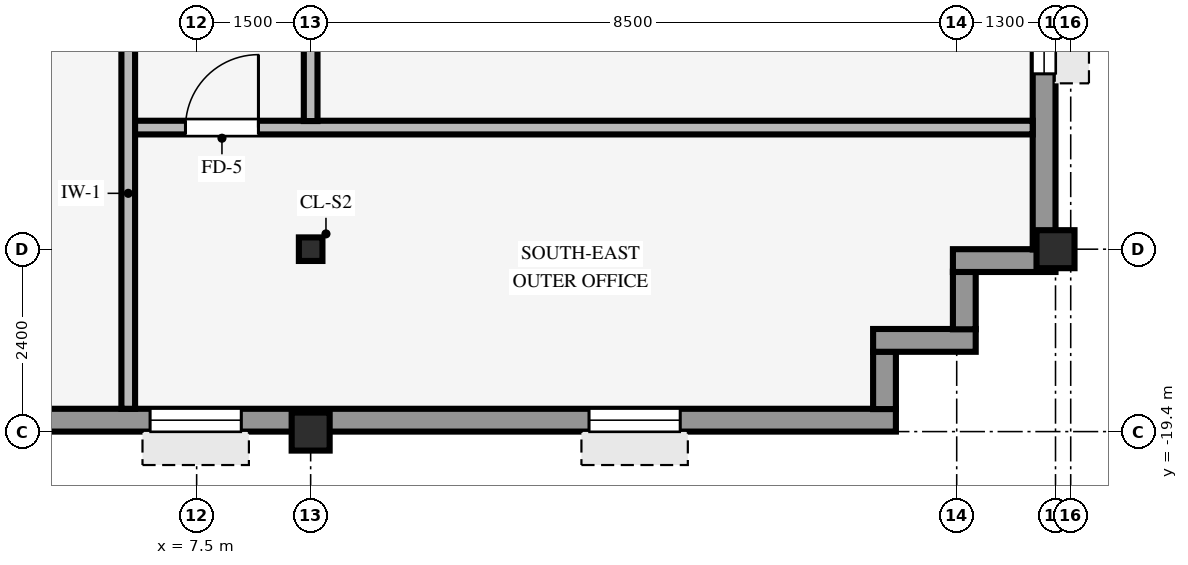
"""IFC4 building model, lengths in metres.
Left out: names, types, materials, properties, quantities, classifications, styles, units other than length and angle.
Written with IfcOpenShell. Run it as: python <this file> out.ifc"""

import sys

from ifc_helpers import new_model, si_unit, direction, frame, frame_2d, origin, origin_2d, place, context, subcontext, project, spatial, rectangle, hollow_rectangle, i_section, extrude, source, transform, mapped, element, fill, save


model = new_model("IFC4")
c1 = context("Model", 3, precision=1e-05, world=origin(), true_north=direction((0.0, 1.0)))
c2 = subcontext(c1, "Body", "Model", "MODEL_VIEW")
j1 = project(units=[si_unit("LENGTHUNIT", "METRE"), si_unit("PLANEANGLEUNIT", "RADIAN")], contexts=[c1])
p1 = place(None, origin())
s1 = spatial("IfcSite", under=j1, at=p1, CompositionType="ELEMENT")
p2 = place(p1, origin())
s2 = spatial("IfcBuilding", under=s1, at=p2, CompositionType="ELEMENT")
p3 = place(p2, frame((0.0, 0.0, 242.0)))
s3 = spatial("IfcBuildingStorey", under=s2, at=p3, CompositionType="ELEMENT", Elevation=242.0)
for number, where, z_axis, x_axis in (
    (1, (18.8, -17.0, 0.0), (0.0, 0.0, 1.0), (1.0, 0.0, 0.0)),
    (2, (9.0, -19.4, 0.0), (0.0, 0.0, 1.0), (1.0, 0.0, 0.0)),
):
    element("IfcColumn", number, at=place(p3, frame(where, z_axis=z_axis, x_axis=x_axis)), inside=s3, PredefinedType="COLUMN", context=c2, shape_type="SweptSolid", body=[
        extrude(hollow_rectangle(XDim=0.5, YDim=0.5, WallThickness=0.032, InnerFilletRadius=0.032, OuterFilletRadius=0.064, at=origin_2d()), origin(), (0.0, 0.0, 1.0), 3.25),
    ])
p4 = place(p3, frame((9.0, -17.0, 0.0), z_axis=(0.0, 0.0, 1.0), x_axis=(1.0, 0.0, 0.0)))
e3 = element("IfcColumn", 3, at=p4, inside=s3, PredefinedType="COLUMN", context=c2, shape_type="SweptSolid", body=[
    extrude(i_section(OverallWidth=0.31, OverallDepth=0.31, WebThickness=0.015, FlangeThickness=0.015, FilletRadius=0.015, at=origin_2d()), origin(), (0.0, 0.0, 1.0), 3.25),
])
p5 = place(p3, frame((-24.3, -19.25, 0.0), z_axis=(0.0, 0.0, 1.0), x_axis=(1.0, 0.0, 0.0)))
e4 = element("IfcWall", 4, at=p5, inside=s3, PredefinedType="STANDARD", context=c2, shape_type="SweptSolid", body=[
    extrude(rectangle(XDim=41.0, YDim=0.3, at=frame_2d((20.5, 0.0))), origin(), (0.0, 0.0, 1.0), 2.585),
])
p6 = place(p5, frame((2.837, 0.0, 0.8)))
e5 = element("IfcOpeningElement", 5, at=p6, cuts=e4, PredefinedType="OPENING", context=c2, shape_type="SweptSolid", body=[
    extrude(rectangle(XDim=1.2, YDim=1.48, at=frame_2d((0.6, 0.74))), frame((0.0, 0.16, 0.0), z_axis=(0.0, -1.0, 0.0), x_axis=(1.0, 0.0, 0.0)), (0.0, 0.0, 1.0), 0.32),
])
p7 = place(p5, frame((7.712, 0.0, 0.8)))
e6 = element("IfcOpeningElement", 6, at=p7, cuts=e4, PredefinedType="OPENING", context=c2, shape_type="SweptSolid", body=[
    extrude(rectangle(XDim=1.2, YDim=1.48, at=frame_2d((0.6, 0.74))), frame((0.0, 0.16, 0.0), z_axis=(0.0, -1.0, 0.0), x_axis=(1.0, 0.0, 0.0)), (0.0, 0.0, 1.0), 0.32),
])
p8 = place(p5, frame((12.587, 0.0, 0.8)))
e7 = element("IfcOpeningElement", 7, at=p8, cuts=e4, PredefinedType="OPENING", context=c2, shape_type="SweptSolid", body=[
    extrude(rectangle(XDim=1.2, YDim=1.48, at=frame_2d((0.6, 0.74))), frame((0.0, 0.16, 0.0), z_axis=(0.0, -1.0, 0.0), x_axis=(1.0, 0.0, 0.0)), (0.0, 0.0, 1.0), 0.32),
])
p9 = place(p5, frame((18.363, 0.0, 0.8)))
e8 = element("IfcOpeningElement", 8, at=p9, cuts=e4, PredefinedType="OPENING", context=c2, shape_type="SweptSolid", body=[
    extrude(rectangle(XDim=1.2, YDim=1.48, at=frame_2d((0.6, 0.74))), frame((0.0, 0.16, 0.0), z_axis=(0.0, -1.0, 0.0), x_axis=(1.0, 0.0, 0.0)), (0.0, 0.0, 1.0), 0.32),
])
p10 = place(p5, frame((21.887, 0.0, 0.8)))
e9 = element("IfcOpeningElement", 9, at=p10, cuts=e4, PredefinedType="OPENING", context=c2, shape_type="SweptSolid", body=[
    extrude(rectangle(XDim=1.2, YDim=1.48, at=frame_2d((0.6, 0.74))), frame((0.0, 0.16, 0.0), z_axis=(0.0, -1.0, 0.0), x_axis=(1.0, 0.0, 0.0)), (0.0, 0.0, 1.0), 0.32),
])
p11 = place(p5, frame((27.212, 0.0, 0.8)))
e10 = element("IfcOpeningElement", 10, at=p11, cuts=e4, PredefinedType="OPENING", context=c2, shape_type="SweptSolid", body=[
    extrude(rectangle(XDim=1.2, YDim=1.48, at=frame_2d((0.6, 0.74))), frame((0.0, 0.16, 0.0), z_axis=(0.0, -1.0, 0.0), x_axis=(1.0, 0.0, 0.0)), (0.0, 0.0, 1.0), 0.32),
])
p12 = place(p5, frame((31.188, 0.0, 0.8)))
e11 = element("IfcOpeningElement", 11, at=p12, cuts=e4, PredefinedType="OPENING", context=c2, shape_type="SweptSolid", body=[
    extrude(rectangle(XDim=1.2, YDim=1.48, at=frame_2d((0.6, 0.74))), frame((0.0, 0.16, 0.0), z_axis=(0.0, -1.0, 0.0), x_axis=(1.0, 0.0, 0.0)), (0.0, 0.0, 1.0), 0.32),
])
p13 = place(p5, frame((36.962, 0.0, 0.8)))
e12 = element("IfcOpeningElement", 12, at=p13, cuts=e4, PredefinedType="OPENING", context=c2, shape_type="SweptSolid", body=[
    extrude(rectangle(XDim=1.2, YDim=1.48, at=frame_2d((0.6, 0.74))), frame((0.0, 0.16, 0.0), z_axis=(0.0, -1.0, 0.0), x_axis=(1.0, 0.0, 0.0)), (0.0, 0.0, 1.0), 0.32),
])
p14 = place(p3, frame((16.55, -19.104, 0.0), z_axis=(0.0, 0.0, 1.0), x_axis=(0.0, 1.0, 0.0)))
e13 = element("IfcWall", 13, at=p14, inside=s3, PredefinedType="STANDARD", context=c2, shape_type="SweptSolid", body=[
    extrude(rectangle(XDim=0.758, YDim=0.3, at=frame_2d((0.379, 0.0))), origin(), (0.0, 0.0, 1.0), 2.772),
])
p15 = place(p3, frame((16.4, -18.2, 0.0), z_axis=(0.0, 0.0, 1.0), x_axis=(1.0, 0.0, 0.0)))
e14 = element("IfcWall", 14, at=p15, inside=s3, PredefinedType="STANDARD", context=c2, shape_type="SweptSolid", body=[
    extrude(rectangle(XDim=1.35, YDim=0.3, at=frame_2d((0.675, 0.0))), origin(), (0.0, 0.0, 1.0), 2.772),
])
p16 = place(p3, frame((17.6, -18.054, 0.0), z_axis=(0.0, 0.0, 1.0), x_axis=(0.0, 1.0, 0.0)))
e15 = element("IfcWall", 15, at=p16, inside=s3, PredefinedType="STANDARD", context=c2, shape_type="SweptSolid", body=[
    extrude(rectangle(XDim=0.758, YDim=0.3, at=frame_2d((0.379, 0.0))), origin(), (0.0, 0.0, 1.0), 2.772),
])
p17 = place(p3, frame((17.45, -17.15, 0.0), z_axis=(0.0, 0.0, 1.0), x_axis=(1.0, 0.0, 0.0)))
e16 = element("IfcWall", 16, at=p17, inside=s3, PredefinedType="STANDARD", context=c2, shape_type="SweptSolid", body=[
    extrude(rectangle(XDim=1.35, YDim=0.3, at=frame_2d((0.675, 0.0))), origin(), (0.0, 0.0, 1.0), 2.772),
])
p18 = place(p3, frame((18.65, -17.004, 0.0), z_axis=(0.0, 0.0, 1.0), x_axis=(0.0, 1.0, 0.0)))
e17 = element("IfcWall", 17, at=p18, inside=s3, PredefinedType="STANDARD", context=c2, shape_type="SweptSolid", body=[
    extrude(rectangle(XDim=34.008, YDim=0.3, at=frame_2d((17.004, 0.0))), origin(), (0.0, 0.0, 1.0), 2.585),
])
p19 = place(p18, frame((2.311, 0.0, 0.8)))
e18 = element("IfcOpeningElement", 18, at=p19, cuts=e17, PredefinedType="OPENING", context=c2, shape_type="SweptSolid", body=[
    extrude(rectangle(XDim=1.95, YDim=1.48, at=frame_2d((0.975, 0.74))), frame((0.0, 0.16, 0.0), z_axis=(0.0, -1.0, 0.0), x_axis=(1.0, 0.0, 0.0)), (0.0, 0.0, 1.0), 0.32),
])
p20 = place(p18, frame((29.747, 0.0, 0.8)))
e19 = element("IfcOpeningElement", 19, at=p20, cuts=e17, PredefinedType="OPENING", context=c2, shape_type="SweptSolid", body=[
    extrude(rectangle(XDim=1.95, YDim=1.48, at=frame_2d((0.975, 0.74))), frame((0.0, 0.16, 0.0), z_axis=(0.0, -1.0, 0.0), x_axis=(1.0, 0.0, 0.0)), (0.0, 0.0, 1.0), 0.32),
])
p21 = place(p3, frame((6.666, -15.4, 0.0), z_axis=(0.0, 0.0, 1.0), x_axis=(1.0, 0.0, 0.0)))
e20 = element("IfcWall", 20, at=p21, inside=s3, PredefinedType="PARTITIONING", context=c2, shape_type="SweptSolid", body=[
    extrude(rectangle(XDim=11.834, YDim=0.18, at=frame_2d((5.917, 0.0))), origin(), (0.0, 0.0, 1.0), 3.24),
])
p22 = place(p21, frame((0.687, 0.0, 0.0)))
e21 = element("IfcOpeningElement", 21, at=p22, cuts=e20, PredefinedType="OPENING", context=c2, shape_type="SweptSolid", body=[
    extrude(rectangle(XDim=0.96, YDim=2.1, at=frame_2d((0.48, 1.05))), frame((0.0, 0.1, 0.0), z_axis=(0.0, -1.0, 0.0), x_axis=(1.0, 0.0, 0.0)), (0.0, 0.0, 1.0), 0.2),
])
p23 = place(p3, frame((6.6, -19.1, 0.0), z_axis=(0.0, 0.0, 1.0), x_axis=(0.0, 1.0, 0.0)))
e22 = element("IfcWall", 22, at=p23, inside=s3, PredefinedType="PARTITIONING", context=c2, shape_type="SweptSolid", body=[
    extrude(rectangle(XDim=17.764, YDim=0.18, at=frame_2d((8.882, 0.0))), origin(), (0.0, 0.0, 1.0), 3.24),
])
p24 = place(p23, frame((13.152, 0.0, 0.0)))
e23 = element("IfcOpeningElement", 23, at=p24, cuts=e22, PredefinedType="OPENING", context=c2, shape_type="SweptSolid", body=[
    extrude(rectangle(XDim=0.96, YDim=2.1, at=frame_2d((0.48, 1.05))), frame((0.0, 0.1, 0.0), z_axis=(0.0, -1.0, 0.0), x_axis=(1.0, 0.0, 0.0)), (0.0, 0.0, 1.0), 0.2),
])
p25 = place(p23, frame((6.12, 0.0, 0.0)))
e24 = element("IfcOpeningElement", 24, at=p25, cuts=e22, PredefinedType="OPENING", context=c2, shape_type="SweptSolid", body=[
    extrude(rectangle(XDim=0.96, YDim=2.1, at=frame_2d((0.48, 1.05))), frame((0.0, 0.1, 0.0), z_axis=(0.0, -1.0, 0.0), x_axis=(1.0, 0.0, 0.0)), (0.0, 0.0, 1.0), 0.2),
])
p26 = place(p3, frame((9.0, -15.314, 0.0), z_axis=(0.0, 0.0, 1.0), x_axis=(0.0, 1.0, 0.0)))
e25 = element("IfcWall", 25, at=p26, inside=s3, PredefinedType="PARTITIONING", context=c2, shape_type="SweptSolid", body=[
    extrude(rectangle(XDim=5.318, YDim=0.18, at=frame_2d((2.659, 0.0))), origin(), (0.0, 0.0, 1.0), 2.772),
])
p27 = place(p26, frame((2.179, 0.0, 0.0)))
e26 = element("IfcOpeningElement", 26, at=p27, cuts=e25, PredefinedType="OPENING", context=c2, shape_type="SweptSolid", body=[
    extrude(rectangle(XDim=0.96, YDim=2.1, at=frame_2d((0.48, 1.05))), frame((0.0, 0.1, 0.0), z_axis=(0.0, -1.0, 0.0), x_axis=(1.0, 0.0, 0.0)), (0.0, 0.0, 1.0), 0.2),
])
m1 = source(origin(), c2, "Body", "SweptSolid", [
    extrude(rectangle(XDim=1.2, YDim=1.48, at=frame_2d((0.6, 0.74))), frame((0.0, 0.03, 0.0), z_axis=(0.0, -1.0, 0.0), x_axis=(1.0, 0.0, 0.0)), (0.0, 0.0, 1.0), 0.06),
])
p28 = place(p12, origin())
e27 = element("IfcWindow", 27, at=p28, inside=s3, PartitioningType="SINGLE_PANEL", PredefinedType="WINDOW", context=c2, shape_type="MappedRepresentation", body=[
    mapped(m1, transform((0.0, 0.0, 0.0), scale=1.0)),
])
fill(e11, e27)
p29 = place(p13, origin())
e28 = element("IfcWindow", 28, at=p29, inside=s3, PartitioningType="SINGLE_PANEL", PredefinedType="WINDOW", context=c2, shape_type="MappedRepresentation", body=[
    mapped(m1, transform((0.0, 0.0, 0.0), scale=1.0)),
])
fill(e12, e28)
m2 = source(origin(), c2, "Body", "SweptSolid", [
    extrude(rectangle(XDim=1.95, YDim=1.48, at=frame_2d((0.975, 0.74))), frame((0.0, 0.03, 0.0), z_axis=(0.0, -1.0, 0.0), x_axis=(1.0, 0.0, 0.0)), (0.0, 0.0, 1.0), 0.06),
])
p30 = place(p19, origin())
e29 = element("IfcWindow", 29, at=p30, inside=s3, PartitioningType="SINGLE_PANEL", PredefinedType="WINDOW", context=c2, shape_type="MappedRepresentation", body=[
    mapped(m2, transform((0.0, 0.0, 0.0), scale=1.0)),
])
fill(e18, e29)
m3 = source(origin(), c2, "Body", "SweptSolid", [
    extrude(rectangle(XDim=0.96, YDim=2.1, at=frame_2d((0.48, 1.05))), frame((0.0, 0.025, 0.0), z_axis=(0.0, -1.0, 0.0), x_axis=(1.0, 0.0, 0.0)), (0.0, 0.0, 1.0), 0.05),
])
p31 = place(p22, origin())
e30 = element("IfcDoor", 30, at=p31, inside=s3, OperationType="SINGLE_SWING_RIGHT", PredefinedType="DOOR", context=c2, shape_type="MappedRepresentation", body=[
    mapped(m3, transform((0.0, 0.0, 0.0), scale=1.0)),
])
fill(e21, e30)
save(model, sys.argv[1])
